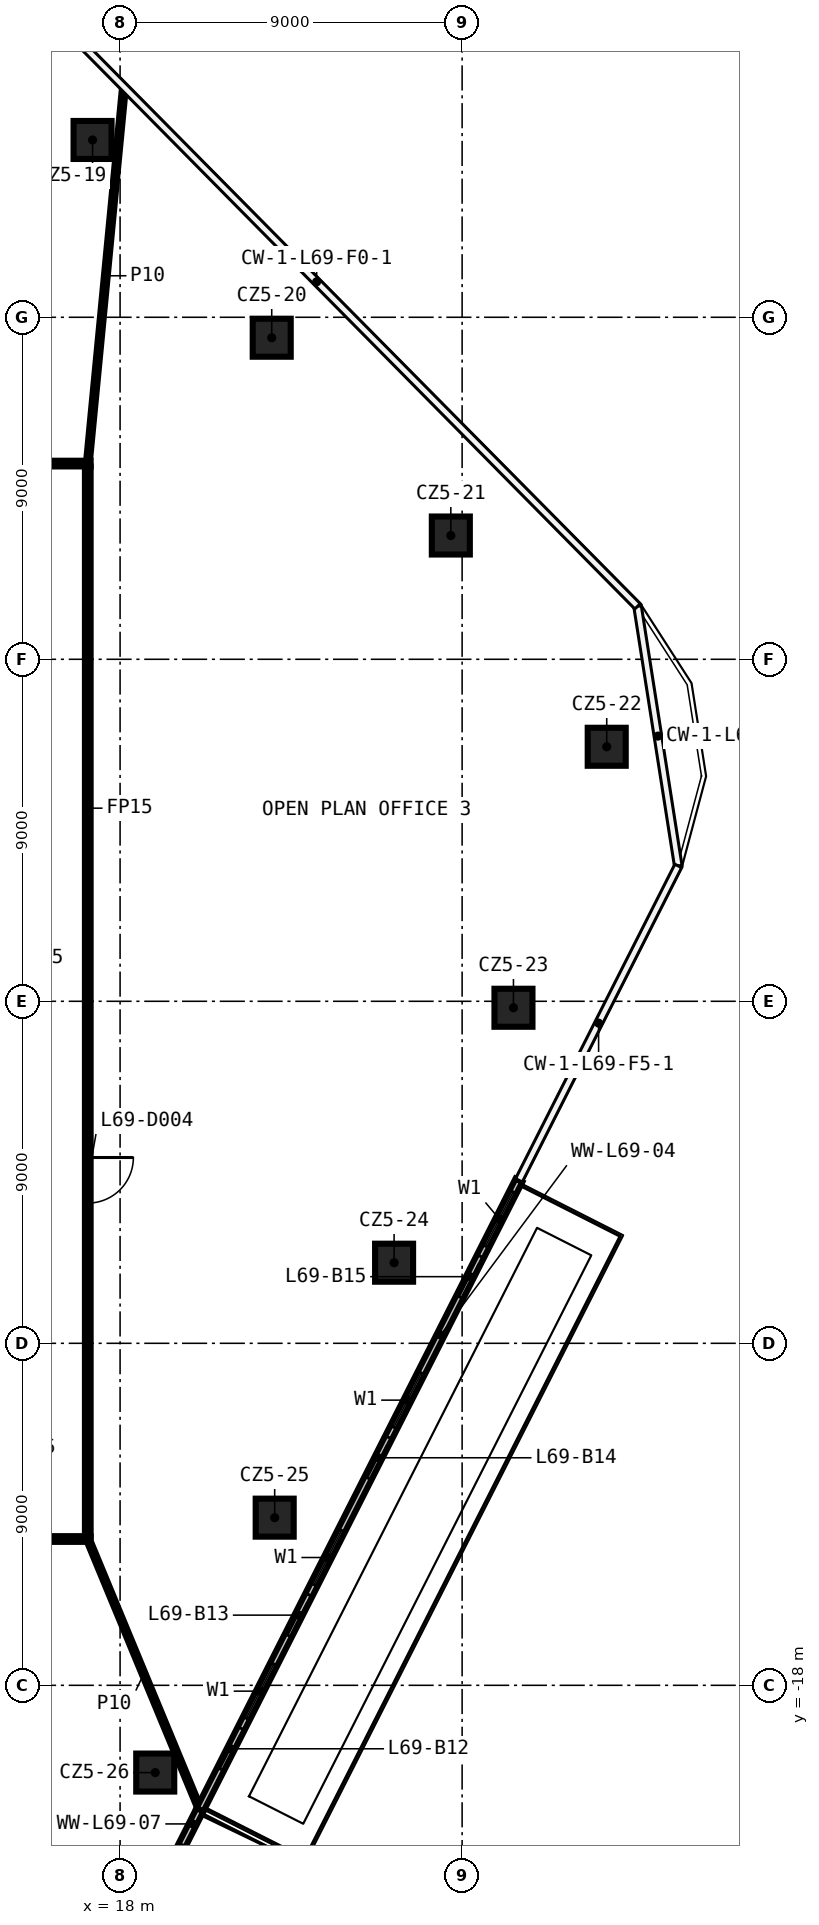
"""IFC4 building model, lengths in metres.
Left out: names, types, materials, properties, quantities, classifications, styles, units other than length and angle.
Written with IfcOpenShell. Run it as: python <this file> out.ifc"""

import sys

from ifc_helpers import new_model, si_unit, direction, frame, frame_2d, origin, origin_2d, place, context, subcontext, project, spatial, rectangle, extrude, element, fill, save


model = new_model("IFC4")
c1 = context("Model", 3, precision=1e-05, world=origin(), true_north=direction((0.0, 1.0)))
c2 = subcontext(c1, "Body", "Model", "MODEL_VIEW")
j1 = project(units=[si_unit("LENGTHUNIT", "METRE"), si_unit("PLANEANGLEUNIT", "RADIAN")], contexts=[c1])
p1 = place(None, origin())
s1 = spatial("IfcSite", under=j1, at=p1, CompositionType="ELEMENT")
p2 = place(p1, origin())
s2 = spatial("IfcBuilding", under=s1, at=p2, CompositionType="ELEMENT")
p3 = place(p2, frame((0.0, 0.0, 323.6)))
s3 = spatial("IfcBuildingStorey", under=s2, at=p3, CompositionType="ELEMENT", Elevation=323.6)
for number, where, z_axis, x_axis in (
    (1, (17.276, 22.666, 0.0), (0.0, 0.0, 1.0), (1.0, 0.0, 0.0)),
    (2, (21.99, 17.462, 0.0), (0.0, 0.0, 1.0), (1.0, 0.0, 0.0)),
    (3, (26.703, 12.257, 0.0), (0.0, 0.0, 1.0), (1.0, 0.0, 0.0)),
    (4, (30.805, 6.698, 0.0), (0.0, 0.0, 1.0), (1.0, 0.0, 0.0)),
    (5, (28.351, -0.17, 0.0), (0.0, 0.0, 1.0), (1.0, 0.0, 0.0)),
    (6, (25.21, -6.879, 0.0), (0.0, 0.0, 1.0), (1.0, 0.0, 0.0)),
    (7, (22.068, -13.588, 0.0), (0.0, 0.0, 1.0), (1.0, 0.0, 0.0)),
    (8, (18.925, -20.296, 0.0), (0.0, 0.0, 1.0), (1.0, 0.0, 0.0)),
):
    element("IfcColumn", number, at=place(p3, frame(where, z_axis=z_axis, x_axis=x_axis)), inside=s3, PredefinedType="COLUMN", context=c2, shape_type="SweptSolid", body=[
        extrude(rectangle(XDim=1.0, YDim=1.0, at=origin_2d()), origin(), (0.0, 0.0, 1.0), 3.82),
    ])
p4 = place(p3, frame((17.225, -14.15, 0.0), z_axis=(0.0, 0.0, 1.0), x_axis=(-1.0, 0.0, 0.0)))
e9 = element("IfcWall", 9, at=p4, inside=s3, PredefinedType="PARTITIONING", context=c2, shape_type="SweptSolid", body=[
    extrude(rectangle(XDim=34.45, YDim=0.15, at=frame_2d((17.225, 0.0))), origin(), (0.0, 0.0, 1.0), 3.82),
])
p5 = place(p4, frame((17.711, 0.0, 0.0)))
e10 = element("IfcOpeningElement", 10, at=p5, cuts=e9, PredefinedType="OPENING", context=c2, shape_type="SweptSolid", body=[
    extrude(rectangle(XDim=1.2, YDim=2.1, at=frame_2d((0.6, 1.05))), frame((0.0, 0.085, 0.0), z_axis=(0.0, -1.0, 0.0), x_axis=(1.0, 0.0, 0.0)), (0.0, 0.0, 1.0), 0.17),
])
p6 = place(p4, frame((4.094, 0.0, 0.0)))
e11 = element("IfcOpeningElement", 11, at=p6, cuts=e9, PredefinedType="OPENING", context=c2, shape_type="SweptSolid", body=[
    extrude(rectangle(XDim=1.2, YDim=2.1, at=frame_2d((0.6, 1.05))), frame((0.0, 0.085, 0.0), z_axis=(0.0, -1.0, 0.0), x_axis=(1.0, 0.0, 0.0)), (0.0, 0.0, 1.0), 0.17),
])
p7 = place(p3, frame((-17.225, 14.15, 0.0), z_axis=(0.0, 0.0, 1.0), x_axis=(1.0, 0.0, 0.0)))
e12 = element("IfcWall", 12, at=p7, inside=s3, PredefinedType="PARTITIONING", context=c2, shape_type="SweptSolid", body=[
    extrude(rectangle(XDim=34.45, YDim=0.15, at=frame_2d((17.225, 0.0))), origin(), (0.0, 0.0, 1.0), 3.82),
])
p8 = place(p7, frame((17.706, 0.0, 0.0)))
e13 = element("IfcOpeningElement", 13, at=p8, cuts=e12, PredefinedType="OPENING", context=c2, shape_type="SweptSolid", body=[
    extrude(rectangle(XDim=1.2, YDim=2.1, at=frame_2d((0.6, 1.05))), frame((0.0, 0.085, 0.0), z_axis=(0.0, -1.0, 0.0), x_axis=(1.0, 0.0, 0.0)), (0.0, 0.0, 1.0), 0.17),
])
p9 = place(p3, frame((17.15, 14.15, 0.0), z_axis=(0.0, 0.0, 1.0), x_axis=(0.095686172631, 0.995411551253, 0.0)))
e14 = element("IfcWall", 14, at=p9, inside=s3, PredefinedType="PARTITIONING", context=c2, shape_type="SweptSolid", body=[
    extrude(rectangle(XDim=9.93, YDim=0.1, at=frame_2d((4.965, 0.0))), origin(), (0.0, 0.0, 1.0), 3.82),
])
p10 = place(p3, frame((17.15, 14.075, 0.0), z_axis=(0.0, 0.0, 1.0), x_axis=(0.0, -1.0, 0.0)))
e15 = element("IfcWall", 15, at=p10, inside=s3, PredefinedType="PARTITIONING", context=c2, shape_type="SweptSolid", body=[
    extrude(rectangle(XDim=28.15, YDim=0.15, at=frame_2d((14.075, 0.0))), origin(), (0.0, 0.0, 1.0), 3.82),
])
p11 = place(p10, frame((18.186, 0.0, 0.0)))
e16 = element("IfcOpeningElement", 16, at=p11, cuts=e15, PredefinedType="OPENING", context=c2, shape_type="SweptSolid", body=[
    extrude(rectangle(XDim=1.2, YDim=2.1, at=frame_2d((0.6, 1.05))), frame((0.0, 0.085, 0.0), z_axis=(0.0, -1.0, 0.0), x_axis=(1.0, 0.0, 0.0)), (0.0, 0.0, 1.0), 0.17),
])
p12 = place(p3, frame((17.15, -14.15, 0.0), z_axis=(0.0, 0.0, 1.0), x_axis=(0.382693080748, -0.923875535961, 0.0)))
e17 = element("IfcWall", 17, at=p12, inside=s3, PredefinedType="PARTITIONING", context=c2, shape_type="SweptSolid", body=[
    extrude(rectangle(XDim=7.687, YDim=0.1, at=frame_2d((3.843, 0.0))), origin(), (0.0, 0.0, 1.0), 3.82),
])
p13 = place(p3, frame((20.102, -21.276, 0.0), z_axis=(0.0, 0.0, 1.0), x_axis=(0.451966467013, 0.892034927957, 0.0)))
e18 = element("IfcWall", 18, at=p13, inside=s3, PredefinedType="SOLIDWALL", context=c2, shape_type="SweptSolid", body=[
    extrude(rectangle(XDim=18.57, YDim=0.2, at=frame_2d((9.285, 0.0))), origin(), (0.0, 0.0, 1.0), 3.82),
])
p14 = place(p13, frame((2.7, 0.0, 0.6)))
e19 = element("IfcOpeningElement", 19, at=p14, cuts=e18, PredefinedType="OPENING", context=c2, shape_type="SweptSolid", body=[
    extrude(rectangle(XDim=1.6, YDim=2.4, at=frame_2d((0.8, 1.2))), frame((0.0, 0.11, 0.0), z_axis=(0.0, -1.0, 0.0), x_axis=(1.0, 0.0, 0.0)), (0.0, 0.0, 1.0), 0.22),
])
p15 = place(p13, frame((1.2, 0.0, 0.0)))
e20 = element("IfcOpeningElement", 20, at=p15, cuts=e18, PredefinedType="OPENING", context=c2, shape_type="SweptSolid", body=[
    extrude(rectangle(XDim=1.2, YDim=2.4, at=frame_2d((0.6, 1.2))), frame((0.0, 0.11, 0.0), z_axis=(0.0, -1.0, 0.0), x_axis=(1.0, 0.0, 0.0)), (0.0, 0.0, 1.0), 0.22),
])
p16 = place(p13, frame((6.643, 0.0, 0.6)))
e21 = element("IfcOpeningElement", 21, at=p16, cuts=e18, PredefinedType="OPENING", context=c2, shape_type="SweptSolid", body=[
    extrude(rectangle(XDim=1.6, YDim=2.4, at=frame_2d((0.8, 1.2))), frame((0.0, 0.11, 0.0), z_axis=(0.0, -1.0, 0.0), x_axis=(1.0, 0.0, 0.0)), (0.0, 0.0, 1.0), 0.22),
])
p17 = place(p13, frame((5.143, 0.0, 0.0)))
e22 = element("IfcOpeningElement", 22, at=p17, cuts=e18, PredefinedType="OPENING", context=c2, shape_type="SweptSolid", body=[
    extrude(rectangle(XDim=1.2, YDim=2.4, at=frame_2d((0.6, 1.2))), frame((0.0, 0.11, 0.0), z_axis=(0.0, -1.0, 0.0), x_axis=(1.0, 0.0, 0.0)), (0.0, 0.0, 1.0), 0.22),
])
p18 = place(p13, frame((11.285, 0.0, 0.6)))
e23 = element("IfcOpeningElement", 23, at=p18, cuts=e18, PredefinedType="OPENING", context=c2, shape_type="SweptSolid", body=[
    extrude(rectangle(XDim=1.6, YDim=2.4, at=frame_2d((0.8, 1.2))), frame((0.0, 0.11, 0.0), z_axis=(0.0, -1.0, 0.0), x_axis=(1.0, 0.0, 0.0)), (0.0, 0.0, 1.0), 0.22),
])
p19 = place(p13, frame((9.785, 0.0, 0.0)))
e24 = element("IfcOpeningElement", 24, at=p19, cuts=e18, PredefinedType="OPENING", context=c2, shape_type="SweptSolid", body=[
    extrude(rectangle(XDim=1.2, YDim=2.4, at=frame_2d((0.6, 1.2))), frame((0.0, 0.11, 0.0), z_axis=(0.0, -1.0, 0.0), x_axis=(1.0, 0.0, 0.0)), (0.0, 0.0, 1.0), 0.22),
])
p20 = place(p13, frame((16.627, 0.0, 0.6)))
e25 = element("IfcOpeningElement", 25, at=p20, cuts=e18, PredefinedType="OPENING", context=c2, shape_type="SweptSolid", body=[
    extrude(rectangle(XDim=1.6, YDim=2.4, at=frame_2d((0.8, 1.2))), frame((0.0, 0.11, 0.0), z_axis=(0.0, -1.0, 0.0), x_axis=(1.0, 0.0, 0.0)), (0.0, 0.0, 1.0), 0.22),
])
p21 = place(p13, frame((15.127, 0.0, 0.0)))
e26 = element("IfcOpeningElement", 26, at=p21, cuts=e18, PredefinedType="OPENING", context=c2, shape_type="SweptSolid", body=[
    extrude(rectangle(XDim=1.2, YDim=2.4, at=frame_2d((0.6, 1.2))), frame((0.0, 0.11, 0.0), z_axis=(0.0, -1.0, 0.0), x_axis=(1.0, 0.0, 0.0)), (0.0, 0.0, 1.0), 0.22),
])
p22 = place(p3, frame((18.008, -25.409, 0.0), z_axis=(0.0, 0.0, 1.0), x_axis=(0.451970383378, 0.892032943646, 0.0)))
e27 = element("IfcWall", 27, at=p22, inside=s3, PredefinedType="SOLIDWALL", context=c2, shape_type="SweptSolid", body=[
    extrude(rectangle(XDim=4.634, YDim=0.2, at=frame_2d((2.317, 0.0))), origin(), (0.0, 0.0, 1.0), 3.82),
])
p23 = place(p22, frame((2.0, 0.0, 0.6)))
e28 = element("IfcOpeningElement", 28, at=p23, cuts=e27, PredefinedType="OPENING", context=c2, shape_type="SweptSolid", body=[
    extrude(rectangle(XDim=1.6, YDim=2.4, at=frame_2d((0.8, 1.2))), frame((0.0, 0.11, 0.0), z_axis=(0.0, -1.0, 0.0), x_axis=(1.0, 0.0, 0.0)), (0.0, 0.0, 1.0), 0.22),
])
p24 = place(p22, frame((0.5, 0.0, 0.0)))
e29 = element("IfcOpeningElement", 29, at=p24, cuts=e27, PredefinedType="OPENING", context=c2, shape_type="SweptSolid", body=[
    extrude(rectangle(XDim=1.2, YDim=2.4, at=frame_2d((0.6, 1.2))), frame((0.0, 0.11, 0.0), z_axis=(0.0, -1.0, 0.0), x_axis=(1.0, 0.0, 0.0)), (0.0, 0.0, 1.0), 0.22),
])
p25 = place(p11, origin())
e30 = element("IfcDoor", 30, at=p25, inside=s3, OperationType="SINGLE_SWING_LEFT", PredefinedType="DOOR", context=c2, shape_type="SweptSolid", body=[
    extrude(rectangle(XDim=1.2, YDim=2.1, at=frame_2d((0.6, 1.05))), frame((0.0, 0.025, 0.0), z_axis=(0.0, -1.0, 0.0), x_axis=(1.0, 0.0, 0.0)), (0.0, 0.0, 1.0), 0.05),
])
fill(e16, e30)
p26 = place(p14, origin())
e31 = element("IfcWindow", 31, at=p26, inside=s3, PartitioningType="SINGLE_PANEL", PredefinedType="WINDOW", context=c2, shape_type="SweptSolid", body=[
    extrude(rectangle(XDim=1.6, YDim=2.4, at=frame_2d((0.8, 1.2))), frame((0.0, 0.03, 0.0), z_axis=(0.0, -1.0, 0.0), x_axis=(1.0, 0.0, 0.0)), (0.0, 0.0, 1.0), 0.06),
])
fill(e19, e31)
p27 = place(p15, origin())
e32 = element("IfcDoor", 32, at=p27, inside=s3, OperationType="SLIDING_TO_LEFT", PredefinedType="DOOR", context=c2, shape_type="SweptSolid", body=[
    extrude(rectangle(XDim=1.2, YDim=2.4, at=frame_2d((0.6, 1.2))), frame((0.0, 0.025, 0.0), z_axis=(0.0, -1.0, 0.0), x_axis=(1.0, 0.0, 0.0)), (0.0, 0.0, 1.0), 0.05),
])
fill(e20, e32)
p28 = place(p16, origin())
e33 = element("IfcWindow", 33, at=p28, inside=s3, PartitioningType="SINGLE_PANEL", PredefinedType="WINDOW", context=c2, shape_type="SweptSolid", body=[
    extrude(rectangle(XDim=1.6, YDim=2.4, at=frame_2d((0.8, 1.2))), frame((0.0, 0.03, 0.0), z_axis=(0.0, -1.0, 0.0), x_axis=(1.0, 0.0, 0.0)), (0.0, 0.0, 1.0), 0.06),
])
fill(e21, e33)
p29 = place(p17, origin())
e34 = element("IfcDoor", 34, at=p29, inside=s3, OperationType="SLIDING_TO_LEFT", PredefinedType="DOOR", context=c2, shape_type="SweptSolid", body=[
    extrude(rectangle(XDim=1.2, YDim=2.4, at=frame_2d((0.6, 1.2))), frame((0.0, 0.025, 0.0), z_axis=(0.0, -1.0, 0.0), x_axis=(1.0, 0.0, 0.0)), (0.0, 0.0, 1.0), 0.05),
])
fill(e22, e34)
p30 = place(p18, origin())
e35 = element("IfcWindow", 35, at=p30, inside=s3, PartitioningType="SINGLE_PANEL", PredefinedType="WINDOW", context=c2, shape_type="SweptSolid", body=[
    extrude(rectangle(XDim=1.6, YDim=2.4, at=frame_2d((0.8, 1.2))), frame((0.0, 0.03, 0.0), z_axis=(0.0, -1.0, 0.0), x_axis=(1.0, 0.0, 0.0)), (0.0, 0.0, 1.0), 0.06),
])
fill(e23, e35)
p31 = place(p19, origin())
e36 = element("IfcDoor", 36, at=p31, inside=s3, OperationType="SLIDING_TO_LEFT", PredefinedType="DOOR", context=c2, shape_type="SweptSolid", body=[
    extrude(rectangle(XDim=1.2, YDim=2.4, at=frame_2d((0.6, 1.2))), frame((0.0, 0.025, 0.0), z_axis=(0.0, -1.0, 0.0), x_axis=(1.0, 0.0, 0.0)), (0.0, 0.0, 1.0), 0.05),
])
fill(e24, e36)
p32 = place(p20, origin())
e37 = element("IfcWindow", 37, at=p32, inside=s3, PartitioningType="SINGLE_PANEL", PredefinedType="WINDOW", context=c2, shape_type="SweptSolid", body=[
    extrude(rectangle(XDim=1.6, YDim=2.4, at=frame_2d((0.8, 1.2))), frame((0.0, 0.03, 0.0), z_axis=(0.0, -1.0, 0.0), x_axis=(1.0, 0.0, 0.0)), (0.0, 0.0, 1.0), 0.06),
])
fill(e25, e37)
p33 = place(p21, origin())
e38 = element("IfcDoor", 38, at=p33, inside=s3, OperationType="SLIDING_TO_LEFT", PredefinedType="DOOR", context=c2, shape_type="SweptSolid", body=[
    extrude(rectangle(XDim=1.2, YDim=2.4, at=frame_2d((0.6, 1.2))), frame((0.0, 0.025, 0.0), z_axis=(0.0, -1.0, 0.0), x_axis=(1.0, 0.0, 0.0)), (0.0, 0.0, 1.0), 0.05),
])
fill(e26, e38)
p34 = place(p23, origin())
e39 = element("IfcWindow", 39, at=p34, inside=s3, PartitioningType="SINGLE_PANEL", PredefinedType="WINDOW", context=c2, shape_type="SweptSolid", body=[
    extrude(rectangle(XDim=1.6, YDim=2.4, at=frame_2d((0.8, 1.2))), frame((0.0, 0.03, 0.0), z_axis=(0.0, -1.0, 0.0), x_axis=(1.0, 0.0, 0.0)), (0.0, 0.0, 1.0), 0.06),
])
fill(e28, e39)
save(model, sys.argv[1])
